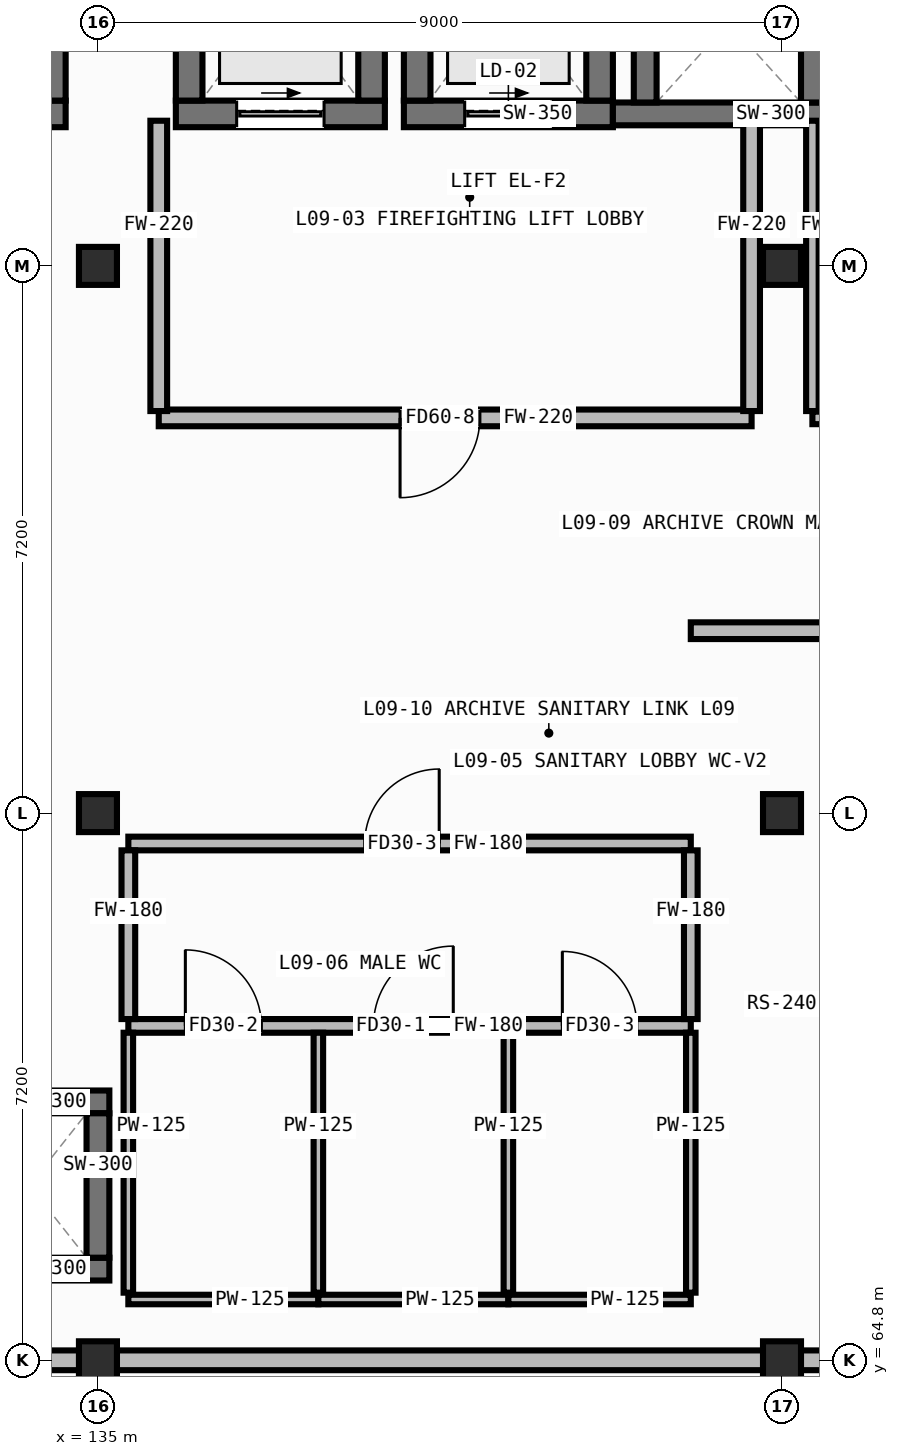
"""IFC4 building model, lengths in metres.
Left out: names, types, materials, properties, quantities, classifications, styles, units other than length and angle.
Written with IfcOpenShell. Run it as: python <this file> out.ifc"""

import sys

from ifc_helpers import new_model, si_unit, direction, frame, frame_2d, origin, origin_2d, place, context, subcontext, project, spatial, rectangle, hollow_rectangle, extrude, element, fill, save


model = new_model("IFC4")
c1 = context("Model", 3, precision=1e-05, world=origin(), true_north=direction((0.0, 1.0)))
c2 = subcontext(c1, "Body", "Model", "MODEL_VIEW")
j1 = project(units=[si_unit("LENGTHUNIT", "METRE"), si_unit("PLANEANGLEUNIT", "RADIAN")], contexts=[c1])
p1 = place(None, origin())
s1 = spatial("IfcSite", under=j1, at=p1, CompositionType="ELEMENT")
p2 = place(p1, origin())
s2 = spatial("IfcBuilding", under=s1, at=p2, CompositionType="ELEMENT")
p3 = place(p2, frame((0.0, 0.0, 31.4)))
s3 = spatial("IfcBuildingStorey", under=s2, at=p3, CompositionType="ELEMENT", Elevation=31.4)
for number, where, z_axis, x_axis in (
    (1, (135.0, 64.8, 0.0), (0.0, 0.0, 1.0), (1.0, 0.0, 0.0)),
    (2, (135.0, 72.0, 0.0), (0.0, 0.0, 1.0), (1.0, 0.0, 0.0)),
    (3, (135.0, 79.2, 0.0), (0.0, 0.0, 1.0), (1.0, 0.0, 0.0)),
    (4, (144.0, 64.8, 0.0), (0.0, 0.0, 1.0), (1.0, 0.0, 0.0)),
    (5, (144.0, 72.0, 0.0), (0.0, 0.0, 1.0), (1.0, 0.0, 0.0)),
    (6, (144.0, 79.2, 0.0), (0.0, 0.0, 1.0), (1.0, 0.0, 0.0)),
):
    element("IfcColumn", number, at=place(p3, frame(where, z_axis=z_axis, x_axis=x_axis)), inside=s3, PredefinedType="COLUMN", context=c2, shape_type="SweptSolid", body=[
        extrude(hollow_rectangle(XDim=0.5, YDim=0.5, WallThickness=0.022, at=origin_2d()), origin(), (0.0, 0.0, 1.0), 3.56),
    ])
p4 = place(p3, frame((126.2, 64.8, 3.8), z_axis=(0.0, 0.0, 1.0), x_axis=(1.0, 0.0, 0.0)))
e7 = element("IfcWall", 7, at=p4, inside=s3, PredefinedType="STANDARD", context=c2, shape_type="SweptSolid", body=[
    extrude(rectangle(XDim=35.6, YDim=0.26, at=frame_2d((17.8, 0.0))), origin(), (0.0, 0.0, 1.0), 1.92),
])
p5 = place(p3, frame((126.425, 81.2, 0.0), z_axis=(0.0, 0.0, 1.0), x_axis=(1.0, 0.0, 0.0)))
e8 = element("IfcWall", 8, at=p5, inside=s3, PredefinedType="SHEAR", context=c2, shape_type="SweptSolid", body=[
    extrude(rectangle(XDim=8.15, YDim=0.35, at=frame_2d((4.075, 0.0))), origin(), (0.0, 0.0, 1.0), 3.56),
])
p6 = place(p5, frame((0.525, 0.0, 0.0)))
e9 = element("IfcOpeningElement", 9, at=p6, cuts=e8, PredefinedType="OPENING", context=c2, shape_type="SweptSolid", body=[
    extrude(rectangle(XDim=1.15, YDim=2.1, at=frame_2d((0.575, 1.05))), frame((0.0, 0.187, 0.0), z_axis=(0.0, -1.0, 0.0), x_axis=(1.0, 0.0, 0.0)), (0.0, 0.0, 1.0), 0.374),
])
p7 = place(p3, frame((134.4, 81.375, 0.0), z_axis=(0.0, 0.0, 1.0), x_axis=(0.0, 1.0, 0.0)))
e10 = element("IfcWall", 10, at=p7, inside=s3, PredefinedType="SHEAR", context=c2, shape_type="SweptSolid", body=[
    extrude(rectangle(XDim=3.55, YDim=0.35, at=frame_2d((1.775, 0.0))), origin(), (0.0, 0.0, 1.0), 3.56),
])
p8 = place(p3, frame((136.025, 81.2, 0.0), z_axis=(0.0, 0.0, 1.0), x_axis=(1.0, 0.0, 0.0)))
e11 = element("IfcWall", 11, at=p8, inside=s3, PredefinedType="SHEAR", context=c2, shape_type="SweptSolid", body=[
    extrude(rectangle(XDim=2.75, YDim=0.35, at=frame_2d((1.375, 0.0))), origin(), (0.0, 0.0, 1.0), 4.25),
])
p9 = place(p8, frame((0.8, 0.0, 0.0)))
e12 = element("IfcOpeningElement", 12, at=p9, cuts=e11, PredefinedType="OPENING", context=c2, shape_type="SweptSolid", body=[
    extrude(rectangle(XDim=1.15, YDim=2.12, at=frame_2d((0.575, 1.06))), frame((0.0, 0.187, 0.0), z_axis=(0.0, -1.0, 0.0), x_axis=(1.0, 0.0, 0.0)), (0.0, 0.0, 1.0), 0.374),
])
for number, where, z_axis, x_axis in (
    (13, (136.2, 81.375, 0.0), (0.0, 0.0, 1.0), (0.0, 1.0, 0.0)),
    (14, (138.6, 81.375, 0.0), (0.0, 0.0, 1.0), (0.0, 1.0, 0.0)),
):
    element("IfcWall", number, at=place(p3, frame(where, z_axis=z_axis, x_axis=x_axis)), inside=s3, PredefinedType="SHEAR", context=c2, shape_type="SweptSolid", body=[
        extrude(rectangle(XDim=2.85, YDim=0.35, at=frame_2d((1.425, 0.0))), origin(), (0.0, 0.0, 1.0), 4.25),
    ])
p10 = place(p3, frame((139.025, 81.2, 0.0), z_axis=(0.0, 0.0, 1.0), x_axis=(1.0, 0.0, 0.0)))
e15 = element("IfcWall", 15, at=p10, inside=s3, PredefinedType="SHEAR", context=c2, shape_type="SweptSolid", body=[
    extrude(rectangle(XDim=2.75, YDim=0.35, at=frame_2d((1.375, 0.0))), origin(), (0.0, 0.0, 1.0), 4.25),
])
p11 = place(p10, frame((0.8, 0.0, 0.0)))
e16 = element("IfcOpeningElement", 16, at=p11, cuts=e15, PredefinedType="OPENING", context=c2, shape_type="SweptSolid", body=[
    extrude(rectangle(XDim=1.15, YDim=2.12, at=frame_2d((0.575, 1.06))), frame((0.0, 0.187, 0.0), z_axis=(0.0, -1.0, 0.0), x_axis=(1.0, 0.0, 0.0)), (0.0, 0.0, 1.0), 0.374),
])
for number, where, z_axis, x_axis in (
    (17, (139.2, 81.375, 0.0), (0.0, 0.0, 1.0), (0.0, 1.0, 0.0)),
    (18, (141.6, 81.375, 0.0), (0.0, 0.0, 1.0), (0.0, 1.0, 0.0)),
):
    element("IfcWall", number, at=place(p3, frame(where, z_axis=z_axis, x_axis=x_axis)), inside=s3, PredefinedType="SHEAR", context=c2, shape_type="SweptSolid", body=[
        extrude(rectangle(XDim=2.85, YDim=0.35, at=frame_2d((1.425, 0.0))), origin(), (0.0, 0.0, 1.0), 4.25),
    ])
p12 = place(p3, frame((141.775, 81.2, 0.0), z_axis=(0.0, 0.0, 1.0), x_axis=(1.0, 0.0, 0.0)))
e19 = element("IfcWall", 19, at=p12, inside=s3, PredefinedType="SHEAR", context=c2, shape_type="SweptSolid", body=[
    extrude(rectangle(XDim=3.25, YDim=0.3, at=frame_2d((1.625, 0.0))), origin(), (0.0, 0.0, 1.0), 3.56),
])
for number, where, z_axis, x_axis in (
    (20, (142.2, 81.35, 0.0), (0.0, 0.0, 1.0), (0.0, 1.0, 0.0)),
    (21, (144.4, 81.35, 0.0), (0.0, 0.0, 1.0), (0.0, 1.0, 0.0)),
    (22, (133.05, 66.0, 0.0), (0.0, 0.0, 1.0), (1.0, 0.0, 0.0)),
    (23, (133.05, 68.2, 0.0), (0.0, 0.0, 1.0), (1.0, 0.0, 0.0)),
):
    element("IfcWall", number, at=place(p3, frame(where, z_axis=z_axis, x_axis=x_axis)), inside=s3, PredefinedType="SHEAR", context=c2, shape_type="SweptSolid", body=[
        extrude(rectangle(XDim=2.1, YDim=0.3, at=frame_2d((1.05, 0.0))), origin(), (0.0, 0.0, 1.0), 3.56),
    ])
p13 = place(p3, frame((135.0, 66.15, 0.0), z_axis=(0.0, 0.0, 1.0), x_axis=(0.0, 1.0, 0.0)))
e24 = element("IfcWall", 24, at=p13, inside=s3, PredefinedType="SHEAR", context=c2, shape_type="SweptSolid", body=[
    extrude(rectangle(XDim=1.9, YDim=0.3, at=frame_2d((0.95, 0.0))), origin(), (0.0, 0.0, 1.0), 3.56),
])
p14 = place(p3, frame((135.8, 77.2, 0.0), z_axis=(0.0, 0.0, 1.0), x_axis=(1.0, 0.0, 0.0)))
e25 = element("IfcWall", 25, at=p14, inside=s3, PredefinedType="PARTITIONING", context=c2, shape_type="SweptSolid", body=[
    extrude(rectangle(XDim=7.8, YDim=0.22, at=frame_2d((3.9, 0.0))), origin(), (0.0, 0.0, 1.0), 3.56),
])
p15 = place(p14, frame((3.175, 0.0, 0.0)))
e26 = element("IfcOpeningElement", 26, at=p15, cuts=e25, PredefinedType="OPENING", context=c2, shape_type="SweptSolid", body=[
    extrude(rectangle(XDim=1.05, YDim=2.02, at=frame_2d((0.525, 1.01))), frame((0.0, 0.122, 0.0), z_axis=(0.0, -1.0, 0.0), x_axis=(1.0, 0.0, 0.0)), (0.0, 0.0, 1.0), 0.244),
])
for number, where, z_axis, x_axis in (
    (27, (135.8, 77.29, 0.0), (0.0, 0.0, 1.0), (0.0, 1.0, 0.0)),
    (28, (143.6, 77.29, 0.0), (0.0, 0.0, 1.0), (0.0, 1.0, 0.0)),
):
    element("IfcWall", number, at=place(p3, frame(where, z_axis=z_axis, x_axis=x_axis)), inside=s3, PredefinedType="PARTITIONING", context=c2, shape_type="SweptSolid", body=[
        extrude(rectangle(XDim=3.82, YDim=0.22, at=frame_2d((1.91, 0.0))), origin(), (0.0, 0.0, 1.0), 3.56),
    ])
p16 = place(p3, frame((144.4, 77.2, 0.0), z_axis=(0.0, 0.0, 1.0), x_axis=(1.0, 0.0, 0.0)))
e29 = element("IfcWall", 29, at=p16, inside=s3, PredefinedType="PARTITIONING", context=c2, shape_type="SweptSolid", body=[
    extrude(rectangle(XDim=8.2, YDim=0.165, at=frame_2d((4.1, 0.0))), origin(), (0.0, 0.0, 1.0), 3.56),
])
p17 = place(p16, frame((3.61, 0.0, 0.0)))
e30 = element("IfcOpeningElement", 30, at=p17, cuts=e29, PredefinedType="OPENING", context=c2, shape_type="SweptSolid", body=[
    extrude(rectangle(XDim=0.98, YDim=2.02, at=frame_2d((0.49, 1.01))), frame((0.0, 0.094, 0.0), z_axis=(0.0, -1.0, 0.0), x_axis=(1.0, 0.0, 0.0)), (0.0, 0.0, 1.0), 0.189),
])
p18 = place(p3, frame((144.4, 77.29, 0.0), z_axis=(0.0, 0.0, 1.0), x_axis=(0.0, 1.0, 0.0)))
e31 = element("IfcWall", 31, at=p18, inside=s3, PredefinedType="PARTITIONING", context=c2, shape_type="SweptSolid", body=[
    extrude(rectangle(XDim=3.82, YDim=0.165, at=frame_2d((1.91, 0.0))), origin(), (0.0, 0.0, 1.0), 3.56),
])
p19 = place(p3, frame((135.4, 69.2, 0.0), z_axis=(0.0, 0.0, 1.0), x_axis=(1.0, 0.0, 0.0)))
e32 = element("IfcWall", 32, at=p19, inside=s3, PredefinedType="PARTITIONING", context=c2, shape_type="SweptSolid", body=[
    extrude(rectangle(XDim=7.4, YDim=0.18, at=frame_2d((3.7, 0.0))), origin(), (0.0, 0.0, 1.0), 3.56),
])
p20 = place(p19, frame((0.75, 0.0, 0.0)))
e33 = element("IfcOpeningElement", 33, at=p20, cuts=e32, PredefinedType="OPENING", context=c2, shape_type="SweptSolid", body=[
    extrude(rectangle(XDim=1.0, YDim=2.08, at=frame_2d((0.5, 1.04))), frame((0.0, 0.102, 0.0), z_axis=(0.0, -1.0, 0.0), x_axis=(1.0, 0.0, 0.0)), (0.0, 0.0, 1.0), 0.204),
])
p21 = place(p19, frame((3.225, 0.0, 0.0)))
e34 = element("IfcOpeningElement", 34, at=p21, cuts=e32, PredefinedType="OPENING", context=c2, shape_type="SweptSolid", body=[
    extrude(rectangle(XDim=1.05, YDim=2.1, at=frame_2d((0.525, 1.05))), frame((0.0, 0.102, 0.0), z_axis=(0.0, -1.0, 0.0), x_axis=(1.0, 0.0, 0.0)), (0.0, 0.0, 1.0), 0.204),
])
p22 = place(p19, frame((5.71, 0.0, 0.0)))
e35 = element("IfcOpeningElement", 35, at=p22, cuts=e32, PredefinedType="OPENING", context=c2, shape_type="SweptSolid", body=[
    extrude(rectangle(XDim=0.98, YDim=2.02, at=frame_2d((0.49, 1.01))), frame((0.0, 0.102, 0.0), z_axis=(0.0, -1.0, 0.0), x_axis=(1.0, 0.0, 0.0)), (0.0, 0.0, 1.0), 0.204),
])
p23 = place(p3, frame((135.4, 71.6, 0.0), z_axis=(0.0, 0.0, 1.0), x_axis=(1.0, 0.0, 0.0)))
e36 = element("IfcWall", 36, at=p23, inside=s3, PredefinedType="PARTITIONING", context=c2, shape_type="SweptSolid", body=[
    extrude(rectangle(XDim=7.4, YDim=0.18, at=frame_2d((3.7, 0.0))), origin(), (0.0, 0.0, 1.0), 3.56),
])
p24 = place(p23, frame((3.11, 0.0, 0.0)))
e37 = element("IfcOpeningElement", 37, at=p24, cuts=e36, PredefinedType="OPENING", context=c2, shape_type="SweptSolid", body=[
    extrude(rectangle(XDim=0.98, YDim=2.02, at=frame_2d((0.49, 1.01))), frame((0.0, 0.102, 0.0), z_axis=(0.0, -1.0, 0.0), x_axis=(1.0, 0.0, 0.0)), (0.0, 0.0, 1.0), 0.204),
])
for number, where, z_axis, x_axis in (
    (38, (135.4, 69.29, 0.0), (0.0, 0.0, 1.0), (0.0, 1.0, 0.0)),
    (39, (142.8, 69.29, 0.0), (0.0, 0.0, 1.0), (0.0, 1.0, 0.0)),
):
    element("IfcWall", number, at=place(p3, frame(where, z_axis=z_axis, x_axis=x_axis)), inside=s3, PredefinedType="PARTITIONING", context=c2, shape_type="SweptSolid", body=[
        extrude(rectangle(XDim=2.22, YDim=0.18, at=frame_2d((1.11, 0.0))), origin(), (0.0, 0.0, 1.0), 3.56),
    ])
p25 = place(p3, frame((135.4, 65.6, 0.0), z_axis=(0.0, 0.0, 1.0), x_axis=(1.0, 0.0, 0.0)))
e40 = element("IfcWall", 40, at=p25, inside=s3, PredefinedType="PARTITIONING", context=c2, shape_type="SweptSolid", body=[
    extrude(rectangle(XDim=2.5, YDim=0.125, at=frame_2d((1.25, 0.0))), origin(), (0.0, 0.0, 1.0), 3.56),
])
for number, where, z_axis, x_axis in (
    (41, (135.4, 65.69, 0.0), (0.0, 0.0, 1.0), (0.0, 1.0, 0.0)),
    (42, (137.9, 65.69, 0.0), (0.0, 0.0, 1.0), (0.0, 1.0, 0.0)),
):
    element("IfcWall", number, at=place(p3, frame(where, z_axis=z_axis, x_axis=x_axis)), inside=s3, PredefinedType="PARTITIONING", context=c2, shape_type="SweptSolid", body=[
        extrude(rectangle(XDim=3.42, YDim=0.125, at=frame_2d((1.71, 0.0))), origin(), (0.0, 0.0, 1.0), 3.56),
    ])
p26 = place(p3, frame((137.9, 65.6, 0.0), z_axis=(0.0, 0.0, 1.0), x_axis=(1.0, 0.0, 0.0)))
e43 = element("IfcWall", 43, at=p26, inside=s3, PredefinedType="PARTITIONING", context=c2, shape_type="SweptSolid", body=[
    extrude(rectangle(XDim=2.5, YDim=0.125, at=frame_2d((1.25, 0.0))), origin(), (0.0, 0.0, 1.0), 3.56),
])
p27 = place(p3, frame((140.4, 65.69, 0.0), z_axis=(0.0, 0.0, 1.0), x_axis=(0.0, 1.0, 0.0)))
e44 = element("IfcWall", 44, at=p27, inside=s3, PredefinedType="PARTITIONING", context=c2, shape_type="SweptSolid", body=[
    extrude(rectangle(XDim=3.42, YDim=0.125, at=frame_2d((1.71, 0.0))), origin(), (0.0, 0.0, 1.0), 3.56),
])
p28 = place(p3, frame((140.4, 65.6, 0.0), z_axis=(0.0, 0.0, 1.0), x_axis=(1.0, 0.0, 0.0)))
e45 = element("IfcWall", 45, at=p28, inside=s3, PredefinedType="PARTITIONING", context=c2, shape_type="SweptSolid", body=[
    extrude(rectangle(XDim=2.4, YDim=0.125, at=frame_2d((1.2, 0.0))), origin(), (0.0, 0.0, 1.0), 3.56),
])
p29 = place(p3, frame((142.8, 65.69, 0.0), z_axis=(0.0, 0.0, 1.0), x_axis=(0.0, 1.0, 0.0)))
e46 = element("IfcWall", 46, at=p29, inside=s3, PredefinedType="PARTITIONING", context=c2, shape_type="SweptSolid", body=[
    extrude(rectangle(XDim=3.42, YDim=0.125, at=frame_2d((1.71, 0.0))), origin(), (0.0, 0.0, 1.0), 3.56),
])
p30 = place(p3, frame((142.8, 74.4, 0.0), z_axis=(0.0, 0.0, 1.0), x_axis=(1.0, 0.0, 0.0)))
e47 = element("IfcWall", 47, at=p30, inside=s3, PredefinedType="PARTITIONING", context=c2, shape_type="SweptSolid", body=[
    extrude(rectangle(XDim=10.8, YDim=0.22, at=frame_2d((5.4, 0.0))), origin(), (0.0, 0.0, 1.0), 3.56),
])
p31 = place(p30, frame((5.125, 0.0, 0.0)))
e48 = element("IfcOpeningElement", 48, at=p31, cuts=e47, PredefinedType="OPENING", context=c2, shape_type="SweptSolid", body=[
    extrude(rectangle(XDim=1.15, YDim=2.1, at=frame_2d((0.575, 1.05))), frame((0.0, 0.122, 0.0), z_axis=(0.0, -1.0, 0.0), x_axis=(1.0, 0.0, 0.0)), (0.0, 0.0, 1.0), 0.244),
])
p32 = place(p9, origin())
e49 = element("IfcDoor", 49, at=p32, inside=s3, OperationType="SLIDING_TO_LEFT", PredefinedType="DOOR", context=c2, shape_type="SweptSolid", body=[
    extrude(rectangle(XDim=1.15, YDim=2.12, at=frame_2d((0.575, 1.06))), frame((0.0, 0.025, 0.0), z_axis=(0.0, -1.0, 0.0), x_axis=(1.0, 0.0, 0.0)), (0.0, 0.0, 1.0), 0.05),
])
fill(e12, e49)
p33 = place(p11, origin())
e50 = element("IfcDoor", 50, at=p33, inside=s3, OperationType="SLIDING_TO_LEFT", PredefinedType="DOOR", context=c2, shape_type="SweptSolid", body=[
    extrude(rectangle(XDim=1.15, YDim=2.12, at=frame_2d((0.575, 1.06))), frame((0.0, 0.025, 0.0), z_axis=(0.0, -1.0, 0.0), x_axis=(1.0, 0.0, 0.0)), (0.0, 0.0, 1.0), 0.05),
])
fill(e16, e50)
p34 = place(p15, frame((1.05, 0.0, 0.0), z_axis=(0.0, 0.0, 1.0), x_axis=(-1.0, 0.0, 0.0)))
e51 = element("IfcDoor", 51, at=p34, inside=s3, OperationType="SINGLE_SWING_RIGHT", PredefinedType="DOOR", context=c2, shape_type="SweptSolid", body=[
    extrude(rectangle(XDim=1.05, YDim=2.02, at=frame_2d((0.525, 1.01))), frame((0.0, 0.025, 0.0), z_axis=(0.0, -1.0, 0.0), x_axis=(1.0, 0.0, 0.0)), (0.0, 0.0, 1.0), 0.05),
])
fill(e26, e51)
p35 = place(p24, origin())
e52 = element("IfcDoor", 52, at=p35, inside=s3, OperationType="SINGLE_SWING_RIGHT", PredefinedType="DOOR", context=c2, shape_type="SweptSolid", body=[
    extrude(rectangle(XDim=0.98, YDim=2.02, at=frame_2d((0.49, 1.01))), frame((0.0, 0.025, 0.0), z_axis=(0.0, -1.0, 0.0), x_axis=(1.0, 0.0, 0.0)), (0.0, 0.0, 1.0), 0.05),
])
fill(e37, e52)
p36 = place(p20, origin())
e53 = element("IfcDoor", 53, at=p36, inside=s3, OperationType="SINGLE_SWING_LEFT", PredefinedType="DOOR", context=c2, shape_type="SweptSolid", body=[
    extrude(rectangle(XDim=1.0, YDim=2.08, at=frame_2d((0.5, 1.04))), frame((0.0, 0.025, 0.0), z_axis=(0.0, -1.0, 0.0), x_axis=(1.0, 0.0, 0.0)), (0.0, 0.0, 1.0), 0.05),
])
fill(e33, e53)
p37 = place(p21, origin())
e54 = element("IfcDoor", 54, at=p37, inside=s3, OperationType="SINGLE_SWING_RIGHT", PredefinedType="DOOR", context=c2, shape_type="SweptSolid", body=[
    extrude(rectangle(XDim=1.05, YDim=2.1, at=frame_2d((0.525, 1.05))), frame((0.0, 0.025, 0.0), z_axis=(0.0, -1.0, 0.0), x_axis=(1.0, 0.0, 0.0)), (0.0, 0.0, 1.0), 0.05),
])
fill(e34, e54)
p38 = place(p22, origin())
e55 = element("IfcDoor", 55, at=p38, inside=s3, OperationType="SINGLE_SWING_LEFT", PredefinedType="DOOR", context=c2, shape_type="SweptSolid", body=[
    extrude(rectangle(XDim=0.98, YDim=2.02, at=frame_2d((0.49, 1.01))), frame((0.0, 0.025, 0.0), z_axis=(0.0, -1.0, 0.0), x_axis=(1.0, 0.0, 0.0)), (0.0, 0.0, 1.0), 0.05),
])
fill(e35, e55)
save(model, sys.argv[1])
